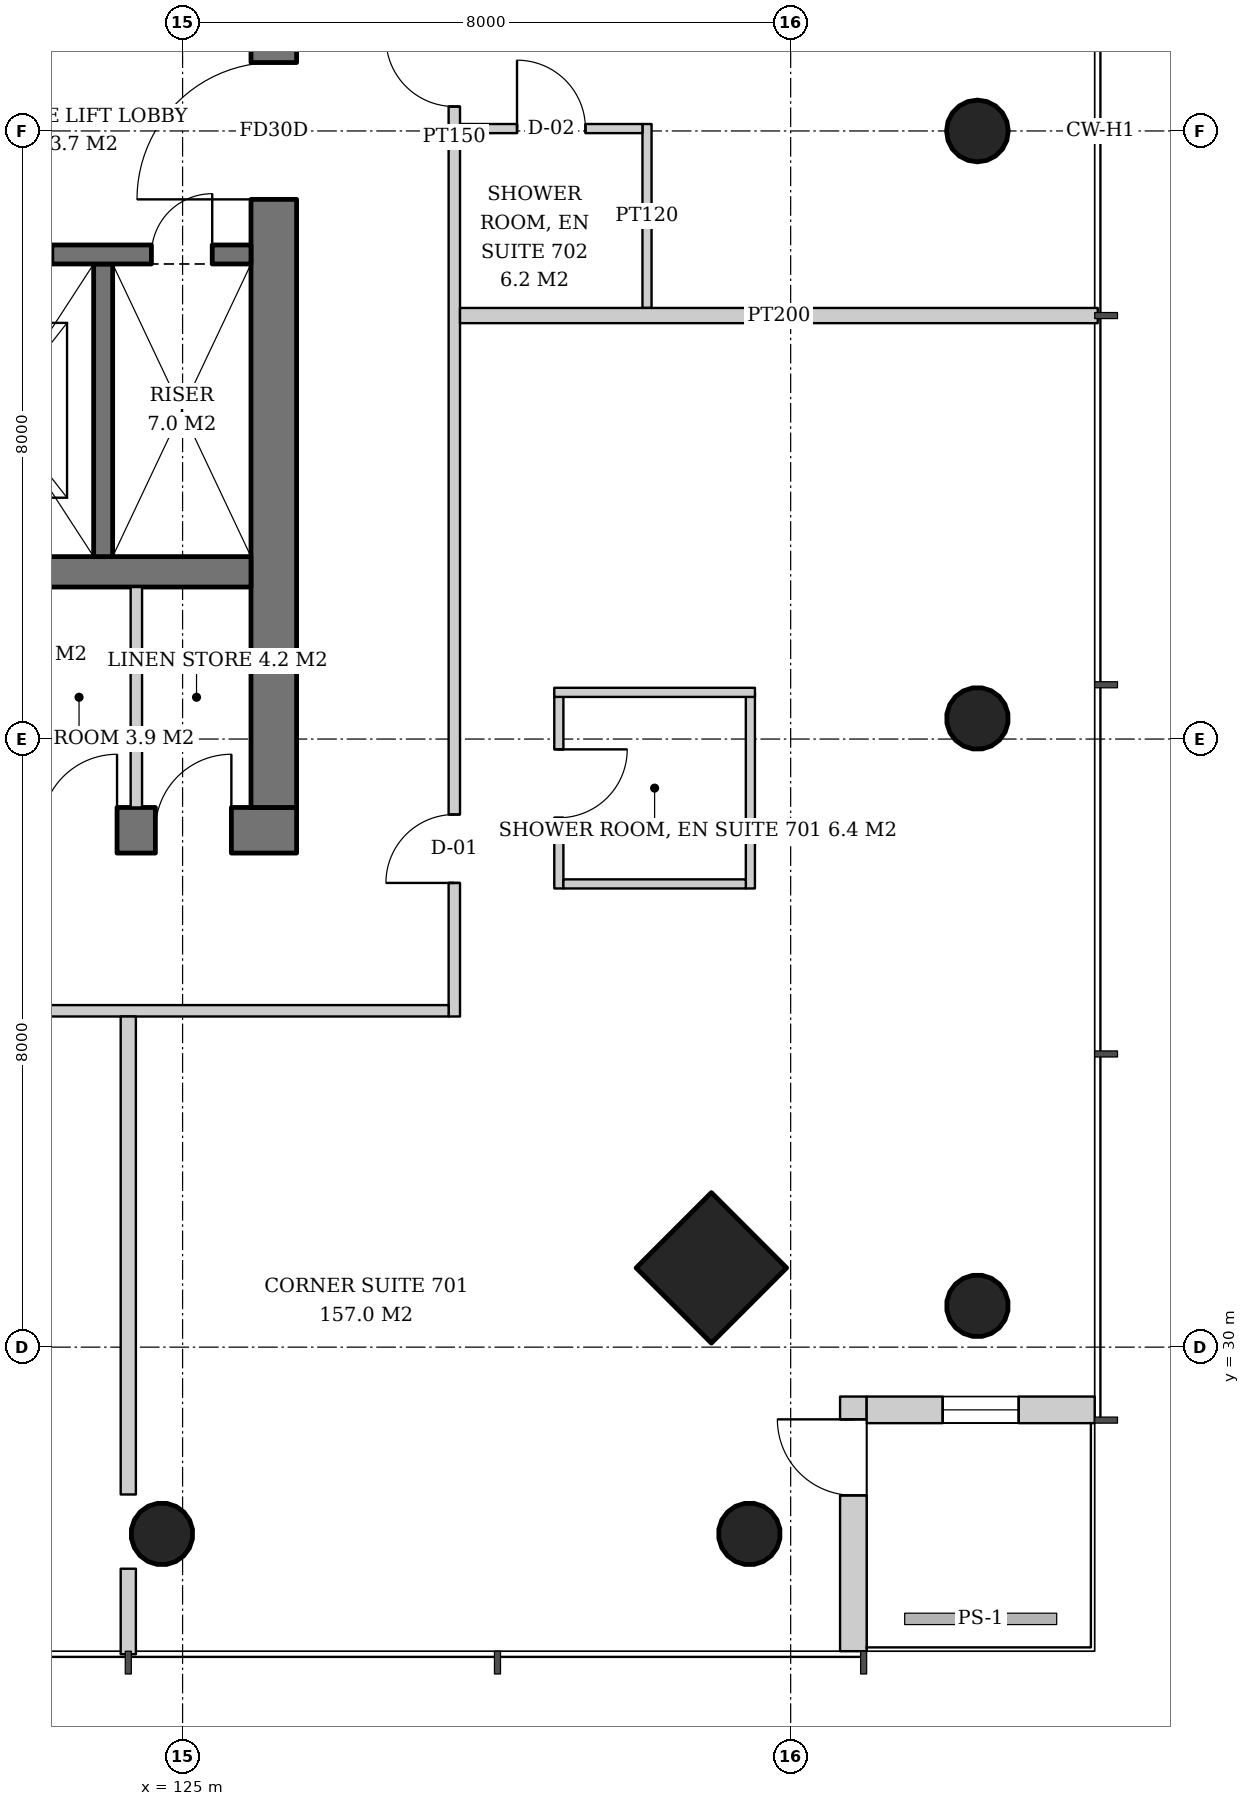
"""IFC4 building model, lengths in metres.
Left out: names, types, materials, properties, quantities, classifications, styles, units other than length and angle.
Written with IfcOpenShell. Run it as: python <this file> out.ifc"""

import sys

from ifc_helpers import new_model, si_unit, direction, frame, frame_2d, origin, origin_2d, place, context, subcontext, project, spatial, rectangle, hollow_circle, extrude, element, fill, save


model = new_model("IFC4")
c1 = context("Model", 3, precision=1e-05, world=origin(), true_north=direction((0.0, 1.0)))
c2 = subcontext(c1, "Body", "Model", "MODEL_VIEW")
j1 = project(units=[si_unit("LENGTHUNIT", "METRE"), si_unit("PLANEANGLEUNIT", "RADIAN")], contexts=[c1])
p1 = place(None, origin())
s1 = spatial("IfcSite", under=j1, at=p1, CompositionType="ELEMENT")
p2 = place(p1, origin())
s2 = spatial("IfcBuilding", under=s1, at=p2, CompositionType="ELEMENT")
p3 = place(p2, frame((0.0, 0.0, 32.4)))
s3 = spatial("IfcBuildingStorey", under=s2, at=p3, CompositionType="ELEMENT", Elevation=32.4)
p4 = place(p3, frame((135.509, 30.491, 0.0), z_axis=(-0.043029647111, 0.043029647111, 0.998146732169), x_axis=(-0.707106781187, -0.707106781187, 0.0)))
e1 = element("IfcColumn", 1, at=p4, inside=s3, PredefinedType="COLUMN", context=c2, shape_type="SweptSolid", body=[
    extrude(hollow_circle(Radius=0.406, WallThickness=0.03, at=origin_2d()), origin(), (0.0, 0.0, 1.0), 3.807),
])
p5 = place(p3, frame((135.509, 38.246, 0.0), z_axis=(-0.043059525333, 0.021561848751, 0.998839808957), x_axis=(-0.44774654769, -0.894160516368, 0.0)))
e2 = element("IfcColumn", 2, at=p5, inside=s3, PredefinedType="COLUMN", context=c2, shape_type="SweptSolid", body=[
    extrude(hollow_circle(Radius=0.406, WallThickness=0.03, at=origin_2d()), origin(), (0.0, 0.0, 1.0), 3.804),
])
p6 = place(p3, frame((135.509, 46.0, 0.0), z_axis=(-0.043069538298, 0.0, 0.999072076915), x_axis=(0.0, -1.0, 0.0)))
e3 = element("IfcColumn", 3, at=p6, inside=s3, PredefinedType="COLUMN", context=c2, shape_type="SweptSolid", body=[
    extrude(hollow_circle(Radius=0.406, WallThickness=0.03, at=origin_2d()), origin(), (0.0, 0.0, 1.0), 3.803),
])
p7 = place(p3, frame((132.009, 30.991, 0.0), z_axis=(-0.043029647111, 0.043029647111, 0.998146732169), x_axis=(-0.707106781187, -0.707106781187, 0.0)))
e4 = element("IfcColumn", 4, at=p7, inside=s3, PredefinedType="COLUMN", context=c2, shape_type="SweptSolid", body=[
    extrude(rectangle(XDim=1.4, YDim=1.4, at=origin_2d()), origin(), (0.0, 0.0, 1.0), 3.807),
])
p8 = place(p3, frame((132.509, 27.491, 0.0), z_axis=(-0.043029647111, 0.043029647111, 0.998146732169), x_axis=(-0.707106781187, -0.707106781187, 0.0)))
e5 = element("IfcColumn", 5, at=p8, inside=s3, PredefinedType="COLUMN", context=c2, shape_type="SweptSolid", body=[
    extrude(hollow_circle(Radius=0.406, WallThickness=0.03, at=origin_2d()), origin(), (0.0, 0.0, 1.0), 3.807),
])
p9 = place(p3, frame((124.754, 27.491, 0.0), z_axis=(-0.021561848751, 0.043059525333, 0.998839808957), x_axis=(-0.894160516368, -0.44774654769, 0.0)))
e6 = element("IfcColumn", 6, at=p9, inside=s3, PredefinedType="COLUMN", context=c2, shape_type="SweptSolid", body=[
    extrude(hollow_circle(Radius=0.406, WallThickness=0.03, at=origin_2d()), origin(), (0.0, 0.0, 1.0), 3.804),
])
p10 = place(p3, frame((107.5, 36.8, 0.0), z_axis=(0.0, 0.0, 1.0), x_axis=(1.0, 0.0, 0.0)))
e7 = element("IfcWall", 7, at=p10, inside=s3, PredefinedType="SHEAR", context=c2, shape_type="SweptSolid", body=[
    extrude(rectangle(XDim=19.0, YDim=0.6, at=frame_2d((9.5, 0.0))), origin(), (0.0, 0.0, 1.0), 3.8),
])
p11 = place(p10, frame((3.9, 0.0, 0.0)))
e8 = element("IfcOpeningElement", 8, at=p11, cuts=e7, PredefinedType="OPENING", context=c2, shape_type="SweptSolid", body=[
    extrude(rectangle(XDim=1.0, YDim=2.1, at=frame_2d((0.5, 1.05))), frame((0.0, 0.31, 0.0), z_axis=(0.0, -1.0, 0.0), x_axis=(1.0, 0.0, 0.0)), (0.0, 0.0, 1.0), 0.62),
])
p12 = place(p10, frame((14.107, 0.0, 0.0)))
e9 = element("IfcOpeningElement", 9, at=p12, cuts=e7, PredefinedType="OPENING", context=c2, shape_type="SweptSolid", body=[
    extrude(rectangle(XDim=1.0, YDim=2.1, at=frame_2d((0.5, 1.05))), frame((0.0, 0.31, 0.0), z_axis=(0.0, -1.0, 0.0), x_axis=(1.0, 0.0, 0.0)), (0.0, 0.0, 1.0), 0.62),
])
p13 = place(p10, frame((15.638, 0.0, 0.0)))
e10 = element("IfcOpeningElement", 10, at=p13, cuts=e7, PredefinedType="OPENING", context=c2, shape_type="SweptSolid", body=[
    extrude(rectangle(XDim=1.0, YDim=2.1, at=frame_2d((0.5, 1.05))), frame((0.0, 0.31, 0.0), z_axis=(0.0, -1.0, 0.0), x_axis=(1.0, 0.0, 0.0)), (0.0, 0.0, 1.0), 0.62),
])
p14 = place(p10, frame((17.142, 0.0, 0.0)))
e11 = element("IfcOpeningElement", 11, at=p14, cuts=e7, PredefinedType="OPENING", context=c2, shape_type="SweptSolid", body=[
    extrude(rectangle(XDim=1.0, YDim=2.1, at=frame_2d((0.5, 1.05))), frame((0.0, 0.31, 0.0), z_axis=(0.0, -1.0, 0.0), x_axis=(1.0, 0.0, 0.0)), (0.0, 0.0, 1.0), 0.62),
])
p15 = place(p3, frame((126.2, 37.1, 0.0), z_axis=(0.0, 0.0, 1.0), x_axis=(0.0, 1.0, 0.0)))
e12 = element("IfcWall", 12, at=p15, inside=s3, PredefinedType="SHEAR", context=c2, shape_type="SweptSolid", body=[
    extrude(rectangle(XDim=17.8, YDim=0.6, at=frame_2d((8.9, 0.0))), origin(), (0.0, 0.0, 1.0), 3.8),
])
p16 = place(p15, frame((8.0, 0.0, 0.0)))
e13 = element("IfcOpeningElement", 13, at=p16, cuts=e12, PredefinedType="OPENING", context=c2, shape_type="SweptSolid", body=[
    extrude(rectangle(XDim=1.8, YDim=2.4, at=frame_2d((0.9, 1.2))), frame((0.0, 0.31, 0.0), z_axis=(0.0, -1.0, 0.0), x_axis=(1.0, 0.0, 0.0)), (0.0, 0.0, 1.0), 0.62),
])
p17 = place(p3, frame((108.1, 40.2, 0.0), z_axis=(0.0, 0.0, 1.0), x_axis=(1.0, 0.0, 0.0)))
e14 = element("IfcWall", 14, at=p17, inside=s3, PredefinedType="SHEAR", context=c2, shape_type="SweptSolid", body=[
    extrude(rectangle(XDim=17.8, YDim=0.4, at=frame_2d((8.9, 0.0))), origin(), (0.0, 0.0, 1.0), 3.8),
])
p18 = place(p3, frame((133.825, 26.0, 0.0), z_axis=(0.0, 0.0, 1.0), x_axis=(0.0, 1.0, 0.0)))
e15 = element("IfcWall", 15, at=p18, inside=s3, PredefinedType="SOLIDWALL", context=c2, shape_type="SweptSolid", body=[
    extrude(rectangle(XDim=3.35, YDim=0.35, at=frame_2d((1.675, 0.0))), origin(), (0.0, 0.0, 1.0), 3.6),
])
p19 = place(p18, frame((2.05, 0.0, 0.0)))
e16 = element("IfcOpeningElement", 16, at=p19, cuts=e15, PredefinedType="OPENING", context=c2, shape_type="SweptSolid", body=[
    extrude(rectangle(XDim=1.0, YDim=2.4, at=frame_2d((0.5, 1.2))), frame((0.0, 0.185, 0.0), z_axis=(0.0, -1.0, 0.0), x_axis=(1.0, 0.0, 0.0)), (0.0, 0.0, 1.0), 0.37),
])
p20 = place(p3, frame((134.0, 29.175, 0.0), z_axis=(0.0, 0.0, 1.0), x_axis=(1.0, 0.0, 0.0)))
e17 = element("IfcWall", 17, at=p20, inside=s3, PredefinedType="SOLIDWALL", context=c2, shape_type="SweptSolid", body=[
    extrude(rectangle(XDim=3.0, YDim=0.35, at=frame_2d((1.5, 0.0))), origin(), (0.0, 0.0, 1.0), 3.6),
])
p21 = place(p20, frame((1.0, 0.0, 0.9)))
e18 = element("IfcOpeningElement", 18, at=p21, cuts=e17, PredefinedType="OPENING", context=c2, shape_type="SweptSolid", body=[
    extrude(rectangle(XDim=1.0, YDim=2.4, at=frame_2d((0.5, 1.2))), frame((0.0, 0.185, 0.0), z_axis=(0.0, -1.0, 0.0), x_axis=(1.0, 0.0, 0.0)), (0.0, 0.0, 1.0), 0.37),
])
p22 = place(p3, frame((123.955, 44.25, 0.0), z_axis=(0.0, 0.0, 1.0), x_axis=(0.0, -1.0, 0.0)))
e19 = element("IfcWall", 19, at=p22, inside=s3, PredefinedType="SHEAR", context=c2, shape_type="SweptSolid", body=[
    extrude(rectangle(XDim=3.85, YDim=0.25, at=frame_2d((1.925, 0.0))), origin(), (0.0, 0.0, 1.0), 3.8),
])
p23 = place(p3, frame((121.33, 44.375, 0.0), z_axis=(0.0, 0.0, 1.0), x_axis=(1.0, 0.0, 0.0)))
e20 = element("IfcWall", 20, at=p23, inside=s3, PredefinedType="SHEAR", context=c2, shape_type="SweptSolid", body=[
    extrude(rectangle(XDim=4.57, YDim=0.25, at=frame_2d((2.285, 0.0))), origin(), (0.0, 0.0, 1.0), 3.8),
])
p24 = place(p23, frame((0.55, 0.0, 0.0)))
e21 = element("IfcOpeningElement", 21, at=p24, cuts=e20, PredefinedType="OPENING", context=c2, shape_type="SweptSolid", body=[
    extrude(rectangle(XDim=1.4, YDim=2.4, at=frame_2d((0.7, 1.2))), frame((0.0, 0.135, 0.0), z_axis=(0.0, -1.0, 0.0), x_axis=(1.0, 0.0, 0.0)), (0.0, 0.0, 1.0), 0.27),
])
p25 = place(p23, frame((3.26, 0.0, 0.0)))
e22 = element("IfcOpeningElement", 22, at=p25, cuts=e20, PredefinedType="OPENING", context=c2, shape_type="SweptSolid", body=[
    extrude(rectangle(XDim=0.8, YDim=2.0, at=frame_2d((0.4, 1.0))), frame((0.0, 0.135, 0.0), z_axis=(0.0, -1.0, 0.0), x_axis=(1.0, 0.0, 0.0)), (0.0, 0.0, 1.0), 0.27),
])
p26 = place(p3, frame((124.392, 37.1, 0.0), z_axis=(0.0, 0.0, 1.0), x_axis=(0.0, 1.0, 0.0)))
e23 = element("IfcWall", 23, at=p26, inside=s3, PredefinedType="SOLIDWALL", context=c2, shape_type="SweptSolid", body=[
    extrude(rectangle(XDim=2.9, YDim=0.15, at=frame_2d((1.45, 0.0))), origin(), (0.0, 0.0, 1.0), 3.6),
])
p27 = place(p3, frame((129.95, 38.614, 0.0), z_axis=(0.0, 0.0, 1.0), x_axis=(0.0, -1.0, 0.0)))
e24 = element("IfcWall", 24, at=p27, inside=s3, PredefinedType="PARTITIONING", context=c2, shape_type="SweptSolid", body=[
    extrude(rectangle(XDim=2.58, YDim=0.12, at=frame_2d((1.29, 0.0))), origin(), (0.0, 0.0, 1.0), 2.8),
])
p28 = place(p27, frame((0.75, 0.0, 0.0)))
e25 = element("IfcOpeningElement", 25, at=p28, cuts=e24, PredefinedType="OPENING", context=c2, shape_type="SweptSolid", body=[
    extrude(rectangle(XDim=0.9, YDim=2.1, at=frame_2d((0.45, 1.05))), frame((0.0, 0.07, 0.0), z_axis=(0.0, -1.0, 0.0), x_axis=(1.0, 0.0, 0.0)), (0.0, 0.0, 1.0), 0.14),
])
p29 = place(p3, frame((132.47, 38.614, 0.0), z_axis=(0.0, 0.0, 1.0), x_axis=(0.0, -1.0, 0.0)))
e26 = element("IfcWall", 26, at=p29, inside=s3, PredefinedType="PARTITIONING", context=c2, shape_type="SweptSolid", body=[
    extrude(rectangle(XDim=2.58, YDim=0.12, at=frame_2d((1.29, 0.0))), origin(), (0.0, 0.0, 1.0), 2.8),
])
p30 = place(p3, frame((130.01, 36.094, 0.0), z_axis=(0.0, 0.0, 1.0), x_axis=(1.0, 0.0, 0.0)))
e27 = element("IfcWall", 27, at=p30, inside=s3, PredefinedType="PARTITIONING", context=c2, shape_type="SweptSolid", body=[
    extrude(rectangle(XDim=2.4, YDim=0.12, at=frame_2d((1.2, 0.0))), origin(), (0.0, 0.0, 1.0), 2.847),
])
p31 = place(p3, frame((129.89, 38.614, 0.0), z_axis=(0.0, 0.0, 1.0), x_axis=(1.0, 0.0, 0.0)))
e28 = element("IfcWall", 28, at=p31, inside=s3, PredefinedType="PARTITIONING", context=c2, shape_type="SweptSolid", body=[
    extrude(rectangle(XDim=2.64, YDim=0.12, at=frame_2d((1.32, 0.0))), origin(), (0.0, 0.0, 1.0), 3.6),
])
p32 = place(p3, frame((131.11, 43.671, 0.0), z_axis=(0.0, 0.0, 1.0), x_axis=(0.0, 1.0, 0.0)))
e29 = element("IfcWall", 29, at=p32, inside=s3, PredefinedType="PARTITIONING", context=c2, shape_type="SweptSolid", body=[
    extrude(rectangle(XDim=2.42, YDim=0.12, at=frame_2d((1.21, 0.0))), origin(), (0.0, 0.0, 1.0), 2.847),
])
p33 = place(p3, frame((128.65, 46.031, 0.0), z_axis=(0.0, 0.0, 1.0), x_axis=(1.0, 0.0, 0.0)))
e30 = element("IfcWall", 30, at=p33, inside=s3, PredefinedType="PARTITIONING", context=c2, shape_type="SweptSolid", body=[
    extrude(rectangle(XDim=2.4, YDim=0.12, at=frame_2d((1.2, 0.0))), origin(), (0.0, 0.0, 1.0), 3.6),
])
p34 = place(p33, frame((0.75, 0.0, 0.0)))
e31 = element("IfcOpeningElement", 31, at=p34, cuts=e30, PredefinedType="OPENING", context=c2, shape_type="SweptSolid", body=[
    extrude(rectangle(XDim=0.9, YDim=2.1, at=frame_2d((0.45, 1.05))), frame((0.0, 0.07, 0.0), z_axis=(0.0, -1.0, 0.0), x_axis=(1.0, 0.0, 0.0)), (0.0, 0.0, 1.0), 0.14),
])
p35 = place(p3, frame((128.575, 34.35, 0.0), z_axis=(0.0, 0.0, 1.0), x_axis=(0.0, 1.0, 0.0)))
e32 = element("IfcWall", 32, at=p35, inside=s3, PredefinedType="PARTITIONING", context=c2, shape_type="SweptSolid", body=[
    extrude(rectangle(XDim=23.15, YDim=0.15, at=frame_2d((11.575, 0.0))), origin(), (0.0, 0.0, 1.0), 2.8),
])
p36 = place(p35, frame((1.757, 0.0, 0.0)))
e33 = element("IfcOpeningElement", 33, at=p36, cuts=e32, PredefinedType="OPENING", context=c2, shape_type="SweptSolid", body=[
    extrude(rectangle(XDim=0.9, YDim=2.1, at=frame_2d((0.45, 1.05))), frame((0.0, 0.085, 0.0), z_axis=(0.0, -1.0, 0.0), x_axis=(1.0, 0.0, 0.0)), (0.0, 0.0, 1.0), 0.17),
])
p37 = place(p35, frame((11.971, 0.0, 0.0)))
e34 = element("IfcOpeningElement", 34, at=p37, cuts=e32, PredefinedType="OPENING", context=c2, shape_type="SweptSolid", body=[
    extrude(rectangle(XDim=0.9, YDim=2.1, at=frame_2d((0.45, 1.05))), frame((0.0, 0.085, 0.0), z_axis=(0.0, -1.0, 0.0), x_axis=(1.0, 0.0, 0.0)), (0.0, 0.0, 1.0), 0.17),
])
p38 = place(p3, frame((128.65, 43.572, 0.0), z_axis=(0.0, 0.0, 1.0), x_axis=(1.0, 0.0, 0.0)))
e35 = element("IfcWall", 35, at=p38, inside=s3, PredefinedType="PARTITIONING", context=c2, shape_type="SweptSolid", body=[
    extrude(rectangle(XDim=8.39, YDim=0.2, at=frame_2d((4.195, 0.0))), origin(), (0.0, 0.0, 1.0), 3.05),
])
p39 = place(p3, frame((105.35, 34.425, 0.0), z_axis=(0.0, 0.0, 1.0), x_axis=(1.0, 0.0, 0.0)))
e36 = element("IfcWall", 36, at=p39, inside=s3, PredefinedType="PARTITIONING", context=c2, shape_type="SweptSolid", body=[
    extrude(rectangle(XDim=23.15, YDim=0.15, at=frame_2d((11.575, 0.0))), origin(), (0.0, 0.0, 1.0), 2.8),
])
p40 = place(p39, frame((1.757, 0.0, 0.0)))
e37 = element("IfcOpeningElement", 37, at=p40, cuts=e36, PredefinedType="OPENING", context=c2, shape_type="SweptSolid", body=[
    extrude(rectangle(XDim=0.9, YDim=2.1, at=frame_2d((0.45, 1.05))), frame((0.0, 0.085, 0.0), z_axis=(0.0, -1.0, 0.0), x_axis=(1.0, 0.0, 0.0)), (0.0, 0.0, 1.0), 0.17),
])
p41 = place(p39, frame((11.971, 0.0, 0.0)))
e38 = element("IfcOpeningElement", 38, at=p41, cuts=e36, PredefinedType="OPENING", context=c2, shape_type="SweptSolid", body=[
    extrude(rectangle(XDim=0.9, YDim=2.1, at=frame_2d((0.45, 1.05))), frame((0.0, 0.085, 0.0), z_axis=(0.0, -1.0, 0.0), x_axis=(1.0, 0.0, 0.0)), (0.0, 0.0, 1.0), 0.17),
])
p42 = place(p3, frame((124.286, 34.35, 0.0), z_axis=(0.0, 0.0, 1.0), x_axis=(0.0, -1.0, 0.0)))
e39 = element("IfcWall", 39, at=p42, inside=s3, PredefinedType="PARTITIONING", context=c2, shape_type="SweptSolid", body=[
    extrude(rectangle(XDim=6.288, YDim=0.2, at=frame_2d((3.144, 0.0))), origin(), (0.0, 0.0, 1.0), 3.6),
])
p43 = place(p3, frame((124.286, 27.085, 0.0), z_axis=(0.0, 0.0, 1.0), x_axis=(0.0, -1.0, 0.0)))
e40 = element("IfcWall", 40, at=p43, inside=s3, PredefinedType="PARTITIONING", context=c2, shape_type="SweptSolid", body=[
    extrude(rectangle(XDim=1.125, YDim=0.2, at=frame_2d((0.562, 0.0))), origin(), (0.0, 0.0, 1.0), 3.6),
])
p44 = place(p19, origin())
e41 = element("IfcDoor", 41, at=p44, inside=s3, OperationType="SINGLE_SWING_RIGHT", PredefinedType="DOOR", context=c2, shape_type="SweptSolid", body=[
    extrude(rectangle(XDim=1.0, YDim=2.4, at=frame_2d((0.5, 1.2))), frame((0.0, 0.025, 0.0), z_axis=(0.0, -1.0, 0.0), x_axis=(1.0, 0.0, 0.0)), (0.0, 0.0, 1.0), 0.05),
])
fill(e16, e41)
p45 = place(p21, origin())
e42 = element("IfcWindow", 42, at=p45, inside=s3, PartitioningType="SINGLE_PANEL", PredefinedType="WINDOW", context=c2, shape_type="SweptSolid", body=[
    extrude(rectangle(XDim=1.0, YDim=2.4, at=frame_2d((0.5, 1.2))), frame((0.0, 0.03, 0.0), z_axis=(0.0, -1.0, 0.0), x_axis=(1.0, 0.0, 0.0)), (0.0, 0.0, 1.0), 0.06),
])
fill(e18, e42)
p46 = place(p25, origin())
e43 = element("IfcDoor", 43, at=p46, inside=s3, OperationType="SINGLE_SWING_RIGHT", PredefinedType="DOOR", context=c2, shape_type="SweptSolid", body=[
    extrude(rectangle(XDim=0.8, YDim=2.0, at=frame_2d((0.4, 1.0))), frame((0.0, 0.025, 0.0), z_axis=(0.0, -1.0, 0.0), x_axis=(1.0, 0.0, 0.0)), (0.0, 0.0, 1.0), 0.05),
])
fill(e22, e43)
p47 = place(p16, origin())
e44 = element("IfcDoor", 44, at=p47, inside=s3, OperationType="DOUBLE_DOOR_SINGLE_SWING", PredefinedType="DOOR", context=c2, shape_type="SweptSolid", body=[
    extrude(rectangle(XDim=1.8, YDim=2.4, at=frame_2d((0.9, 1.2))), frame((0.0, 0.025, 0.0), z_axis=(0.0, -1.0, 0.0), x_axis=(1.0, 0.0, 0.0)), (0.0, 0.0, 1.0), 0.05),
])
fill(e13, e44)
p48 = place(p13, origin())
e45 = element("IfcDoor", 45, at=p48, inside=s3, OperationType="SINGLE_SWING_RIGHT", PredefinedType="DOOR", context=c2, shape_type="SweptSolid", body=[
    extrude(rectangle(XDim=1.0, YDim=2.1, at=frame_2d((0.5, 1.05))), frame((0.0, 0.29, 0.0), z_axis=(0.0, -1.0, 0.0), x_axis=(1.0, 0.0, 0.0)), (0.0, 0.0, 1.0), 0.05),
])
fill(e10, e45)
p49 = place(p14, origin())
e46 = element("IfcDoor", 46, at=p49, inside=s3, OperationType="SINGLE_SWING_RIGHT", PredefinedType="DOOR", context=c2, shape_type="SweptSolid", body=[
    extrude(rectangle(XDim=1.0, YDim=2.1, at=frame_2d((0.5, 1.05))), frame((0.0, 0.29, 0.0), z_axis=(0.0, -1.0, 0.0), x_axis=(1.0, 0.0, 0.0)), (0.0, 0.0, 1.0), 0.05),
])
fill(e11, e46)
p50 = place(p28, origin())
e47 = element("IfcDoor", 47, at=p50, inside=s3, OperationType="SINGLE_SWING_LEFT", PredefinedType="DOOR", context=c2, shape_type="SweptSolid", body=[
    extrude(rectangle(XDim=0.9, YDim=2.1, at=frame_2d((0.45, 1.05))), frame((0.0, 0.025, 0.0), z_axis=(0.0, -1.0, 0.0), x_axis=(1.0, 0.0, 0.0)), (0.0, 0.0, 1.0), 0.05),
])
fill(e25, e47)
p51 = place(p34, origin())
e48 = element("IfcDoor", 48, at=p51, inside=s3, OperationType="SINGLE_SWING_LEFT", PredefinedType="DOOR", context=c2, shape_type="SweptSolid", body=[
    extrude(rectangle(XDim=0.9, YDim=2.1, at=frame_2d((0.45, 1.05))), frame((0.0, 0.025, 0.0), z_axis=(0.0, -1.0, 0.0), x_axis=(1.0, 0.0, 0.0)), (0.0, 0.0, 1.0), 0.05),
])
fill(e31, e48)
p52 = place(p36, origin())
e49 = element("IfcDoor", 49, at=p52, inside=s3, OperationType="SINGLE_SWING_LEFT", PredefinedType="DOOR", context=c2, shape_type="SweptSolid", body=[
    extrude(rectangle(XDim=0.9, YDim=2.1, at=frame_2d((0.45, 1.05))), frame((0.0, 0.025, 0.0), z_axis=(0.0, -1.0, 0.0), x_axis=(1.0, 0.0, 0.0)), (0.0, 0.0, 1.0), 0.05),
])
fill(e33, e49)
p53 = place(p37, origin())
e50 = element("IfcDoor", 50, at=p53, inside=s3, OperationType="SINGLE_SWING_RIGHT", PredefinedType="DOOR", context=c2, shape_type="SweptSolid", body=[
    extrude(rectangle(XDim=0.9, YDim=2.1, at=frame_2d((0.45, 1.05))), frame((0.0, 0.025, 0.0), z_axis=(0.0, -1.0, 0.0), x_axis=(1.0, 0.0, 0.0)), (0.0, 0.0, 1.0), 0.05),
])
fill(e34, e50)
save(model, sys.argv[1])
